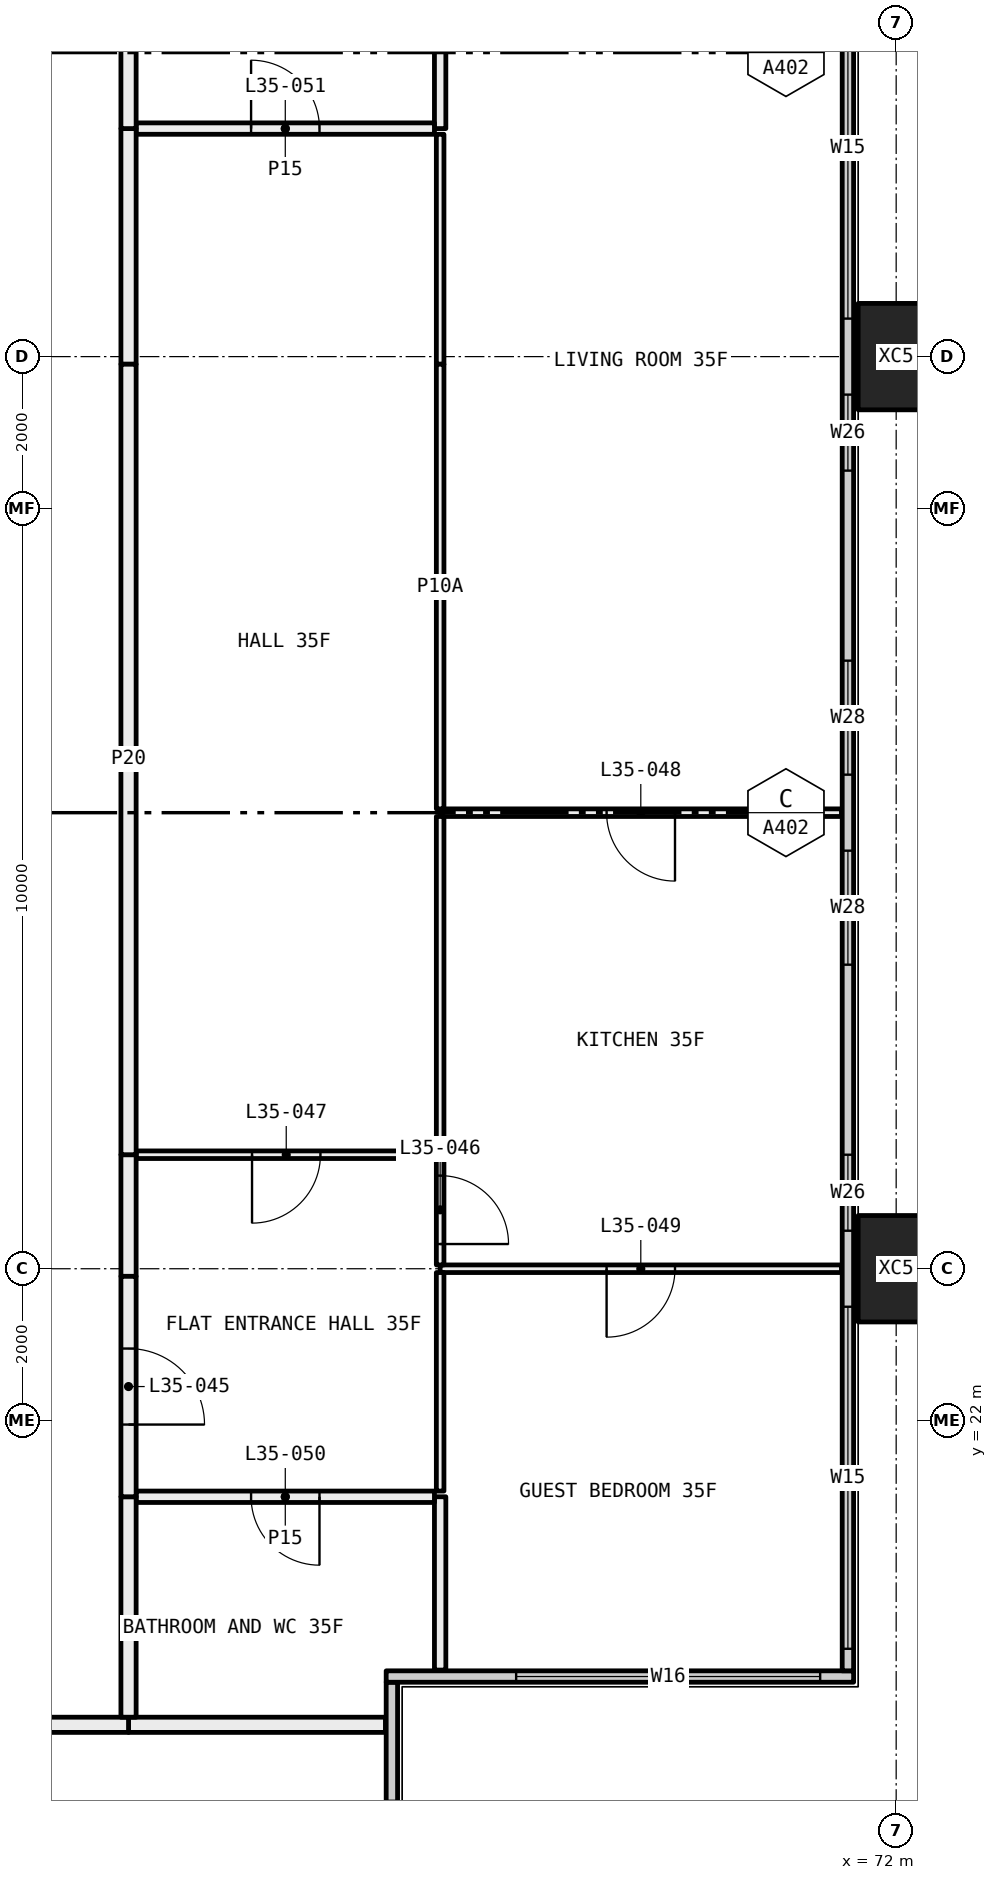
"""IFC4 building model, lengths in metres.
Left out: names, types, materials, properties, quantities, classifications, styles, units other than length and angle.
Written with IfcOpenShell. Run it as: python <this file> out.ifc"""

import sys

from ifc_helpers import new_model, si_unit, direction, frame, frame_2d, origin, origin_2d, place, context, subcontext, project, spatial, rectangle, hollow_rectangle, extrude, element, fill, save


model = new_model("IFC4")
c1 = context("Model", 3, precision=1e-05, world=origin(), true_north=direction((0.0, 1.0)))
c2 = subcontext(c1, "Body", "Model", "MODEL_VIEW")
j1 = project(units=[si_unit("LENGTHUNIT", "METRE"), si_unit("PLANEANGLEUNIT", "RADIAN")], contexts=[c1])
p1 = place(None, origin())
s1 = spatial("IfcSite", under=j1, at=p1, CompositionType="ELEMENT")
p2 = place(p1, origin())
s2 = spatial("IfcBuilding", under=s1, at=p2, CompositionType="ELEMENT")
p3 = place(p2, frame((0.0, 0.0, 134.55)))
s3 = spatial("IfcBuildingStorey", under=s2, at=p3, CompositionType="ELEMENT", Elevation=134.55)
for number, where, z_axis, x_axis in (
    (1, (72.0, 24.0, -0.4), (0.0, 0.0, 1.0), (0.0, 1.0, 0.0)),
    (2, (72.0, 36.0, -0.4), (0.0, 0.0, 1.0), (0.0, 1.0, 0.0)),
):
    element("IfcColumn", number, at=place(p3, frame(where, z_axis=z_axis, x_axis=x_axis)), inside=s3, PredefinedType="COLUMN", context=c2, shape_type="SweptSolid", body=[
        extrude(hollow_rectangle(XDim=1.4, YDim=1.0, WallThickness=0.055, at=origin_2d()), origin(), (0.0, 0.0, 1.0), 3.45),
    ])
p4 = place(p3, frame((65.365, 12.71, 0.0), z_axis=(0.0, 0.0, 1.0), x_axis=(0.0, 1.0, 0.0)))
e3 = element("IfcWall", 3, at=p4, inside=s3, PredefinedType="ELEMENTEDWALL", context=c2, shape_type="SweptSolid", body=[
    extrude(rectangle(XDim=5.85, YDim=0.15, at=frame_2d((2.925, 0.0))), origin(), (0.0, 0.0, 1.0), 3.05),
])
p5 = place(p4, frame((0.29, 0.0, 0.45)))
e4 = element("IfcOpeningElement", 4, at=p5, cuts=e3, PredefinedType="OPENING", context=c2, shape_type="SweptSolid", body=[
    extrude(rectangle(XDim=4.0, YDim=2.55, at=frame_2d((2.0, 1.275))), frame((0.0, 0.085, 0.0), z_axis=(0.0, -1.0, 0.0), x_axis=(1.0, 0.0, 0.0)), (0.0, 0.0, 1.0), 0.17),
])
p6 = place(p3, frame((65.29, 18.635, 0.0), z_axis=(0.0, 0.0, 1.0), x_axis=(1.0, 0.0, 0.0)))
e5 = element("IfcWall", 5, at=p6, inside=s3, PredefinedType="ELEMENTEDWALL", context=c2, shape_type="SweptSolid", body=[
    extrude(rectangle(XDim=6.15, YDim=0.15, at=frame_2d((3.075, 0.0))), origin(), (0.0, 0.0, 1.0), 3.05),
])
p7 = place(p6, frame((1.71, 0.0, 0.45)))
e6 = element("IfcOpeningElement", 6, at=p7, cuts=e5, PredefinedType="OPENING", context=c2, shape_type="SweptSolid", body=[
    extrude(rectangle(XDim=4.0, YDim=2.55, at=frame_2d((2.0, 1.275))), frame((0.0, 0.085, 0.0), z_axis=(0.0, -1.0, 0.0), x_axis=(1.0, 0.0, 0.0)), (0.0, 0.0, 1.0), 0.17),
])
p8 = place(p3, frame((71.365, 18.71, 0.0), z_axis=(0.0, 0.0, 1.0), x_axis=(0.0, 1.0, 0.0)))
e7 = element("IfcWall", 7, at=p8, inside=s3, PredefinedType="ELEMENTEDWALL", context=c2, shape_type="SweptSolid", body=[
    extrude(rectangle(XDim=22.58, YDim=0.15, at=frame_2d((11.29, 0.0))), origin(), (0.0, 0.0, 1.0), 3.05),
])
p9 = place(p8, frame((0.29, 0.0, 0.45)))
e8 = element("IfcOpeningElement", 8, at=p9, cuts=e7, PredefinedType="OPENING", context=c2, shape_type="SweptSolid", body=[
    extrude(rectangle(XDim=4.5, YDim=2.55, at=frame_2d((2.25, 1.275))), frame((0.0, 0.085, 0.0), z_axis=(0.0, -1.0, 0.0), x_axis=(1.0, 0.0, 0.0)), (0.0, 0.0, 1.0), 0.17),
])
p10 = place(p8, frame((5.79, 0.0, 0.45)))
e9 = element("IfcOpeningElement", 9, at=p10, cuts=e7, PredefinedType="OPENING", context=c2, shape_type="SweptSolid", body=[
    extrude(rectangle(XDim=1.0, YDim=2.55, at=frame_2d((0.5, 1.275))), frame((0.0, 0.085, 0.0), z_axis=(0.0, -1.0, 0.0), x_axis=(1.0, 0.0, 0.0)), (0.0, 0.0, 1.0), 0.17),
])
p11 = place(p8, frame((9.29, 0.0, 0.45)))
e10 = element("IfcOpeningElement", 10, at=p11, cuts=e7, PredefinedType="OPENING", context=c2, shape_type="SweptSolid", body=[
    extrude(rectangle(XDim=1.5, YDim=2.55, at=frame_2d((0.75, 1.275))), frame((0.0, 0.085, 0.0), z_axis=(0.0, -1.0, 0.0), x_axis=(1.0, 0.0, 0.0)), (0.0, 0.0, 1.0), 0.17),
])
p12 = place(p8, frame((11.79, 0.0, 0.45)))
e11 = element("IfcOpeningElement", 11, at=p12, cuts=e7, PredefinedType="OPENING", context=c2, shape_type="SweptSolid", body=[
    extrude(rectangle(XDim=1.5, YDim=2.55, at=frame_2d((0.75, 1.275))), frame((0.0, 0.085, 0.0), z_axis=(0.0, -1.0, 0.0), x_axis=(1.0, 0.0, 0.0)), (0.0, 0.0, 1.0), 0.17),
])
p13 = place(p8, frame((15.79, 0.0, 0.45)))
e12 = element("IfcOpeningElement", 12, at=p13, cuts=e7, PredefinedType="OPENING", context=c2, shape_type="SweptSolid", body=[
    extrude(rectangle(XDim=1.0, YDim=2.55, at=frame_2d((0.5, 1.275))), frame((0.0, 0.085, 0.0), z_axis=(0.0, -1.0, 0.0), x_axis=(1.0, 0.0, 0.0)), (0.0, 0.0, 1.0), 0.17),
])
p14 = place(p8, frame((17.79, 0.0, 0.45)))
e13 = element("IfcOpeningElement", 13, at=p14, cuts=e7, PredefinedType="OPENING", context=c2, shape_type="SweptSolid", body=[
    extrude(rectangle(XDim=4.5, YDim=2.55, at=frame_2d((2.25, 1.275))), frame((0.0, 0.085, 0.0), z_axis=(0.0, -1.0, 0.0), x_axis=(1.0, 0.0, 0.0)), (0.0, 0.0, 1.0), 0.17),
])
p15 = place(p3, frame((65.28, 18.0, 0.0), z_axis=(0.0, 0.0, 1.0), x_axis=(-1.0, 0.0, 0.0)))
e14 = element("IfcWall", 14, at=p15, inside=s3, PredefinedType="PARTITIONING", context=c2, shape_type="SweptSolid", body=[
    extrude(rectangle(XDim=3.38, YDim=0.2, at=frame_2d((1.69, 0.0))), origin(), (0.0, 0.0, 1.0), 3.05),
])
p16 = place(p3, frame((61.9, 18.0, 0.0), z_axis=(0.0, 0.0, 1.0), x_axis=(-1.0, 0.0, 0.0)))
e15 = element("IfcWall", 15, at=p16, inside=s3, PredefinedType="PARTITIONING", context=c2, shape_type="SweptSolid", body=[
    extrude(rectangle(XDim=1.9, YDim=0.2, at=frame_2d((0.95, 0.0))), origin(), (0.0, 0.0, 1.0), 3.05),
])
p17 = place(p3, frame((71.28, 24.0, 0.0), z_axis=(0.0, 0.0, 1.0), x_axis=(-1.0, 0.0, 0.0)))
e16 = element("IfcWall", 16, at=p17, inside=s3, PredefinedType="PARTITIONING", context=c2, shape_type="SweptSolid", body=[
    extrude(rectangle(XDim=5.28, YDim=0.1, at=frame_2d((2.64, 0.0))), origin(), (0.0, 0.0, 1.0), 2.45),
])
p18 = place(p17, frame((2.19, 0.0, 0.0)))
e17 = element("IfcOpeningElement", 17, at=p18, cuts=e16, PredefinedType="OPENING", context=c2, shape_type="SweptSolid", body=[
    extrude(rectangle(XDim=0.9, YDim=2.1, at=frame_2d((0.45, 1.05))), frame((0.0, 0.06, 0.0), z_axis=(0.0, -1.0, 0.0), x_axis=(1.0, 0.0, 0.0)), (0.0, 0.0, 1.0), 0.12),
])
p19 = place(p3, frame((66.0, 21.0, 0.0), z_axis=(0.0, 0.0, 1.0), x_axis=(0.0, -1.0, 0.0)))
e18 = element("IfcWall", 18, at=p19, inside=s3, PredefinedType="PARTITIONING", context=c2, shape_type="SweptSolid", body=[
    extrude(rectangle(XDim=2.28, YDim=0.15, at=frame_2d((1.14, 0.0))), origin(), (0.0, 0.0, 1.0), 3.05),
])
p20 = place(p3, frame((66.0, 23.95, 0.0), z_axis=(0.0, 0.0, 1.0), x_axis=(0.0, -1.0, 0.0)))
e19 = element("IfcWall", 19, at=p20, inside=s3, PredefinedType="PARTITIONING", context=c2, shape_type="SweptSolid", body=[
    extrude(rectangle(XDim=2.875, YDim=0.1, at=frame_2d((1.438, 0.0))), origin(), (0.0, 0.0, 1.0), 2.45),
])
p21 = place(p3, frame((71.28, 30.0, 0.0), z_axis=(0.0, 0.0, 1.0), x_axis=(-1.0, 0.0, 0.0)))
e20 = element("IfcWall", 20, at=p21, inside=s3, PredefinedType="PARTITIONING", context=c2, shape_type="SweptSolid", body=[
    extrude(rectangle(XDim=5.28, YDim=0.1, at=frame_2d((2.64, 0.0))), origin(), (0.0, 0.0, 1.0), 3.05),
])
p22 = place(p21, frame((2.19, 0.0, 0.0)))
e21 = element("IfcOpeningElement", 21, at=p22, cuts=e20, PredefinedType="OPENING", context=c2, shape_type="SweptSolid", body=[
    extrude(rectangle(XDim=0.9, YDim=2.1, at=frame_2d((0.45, 1.05))), frame((0.0, 0.06, 0.0), z_axis=(0.0, -1.0, 0.0), x_axis=(1.0, 0.0, 0.0)), (0.0, 0.0, 1.0), 0.12),
])
p23 = place(p3, frame((66.0, 25.5, 0.0), z_axis=(0.0, 0.0, 1.0), x_axis=(0.0, -1.0, 0.0)))
e22 = element("IfcWall", 22, at=p23, inside=s3, PredefinedType="PARTITIONING", context=c2, shape_type="SweptSolid", body=[
    extrude(rectangle(XDim=1.45, YDim=0.1, at=frame_2d((0.725, 0.0))), origin(), (0.0, 0.0, 1.0), 2.45),
])
p24 = place(p23, frame((0.275, 0.0, 0.0)))
e23 = element("IfcOpeningElement", 23, at=p24, cuts=e22, PredefinedType="OPENING", context=c2, shape_type="SweptSolid", body=[
    extrude(rectangle(XDim=0.9, YDim=2.1, at=frame_2d((0.45, 1.05))), frame((0.0, 0.06, 0.0), z_axis=(0.0, -1.0, 0.0), x_axis=(1.0, 0.0, 0.0)), (0.0, 0.0, 1.0), 0.12),
])
p25 = place(p3, frame((66.0, 29.95, 0.0), z_axis=(0.0, 0.0, 1.0), x_axis=(0.0, -1.0, 0.0)))
e24 = element("IfcWall", 24, at=p25, inside=s3, PredefinedType="PARTITIONING", context=c2, shape_type="SweptSolid", body=[
    extrude(rectangle(XDim=4.45, YDim=0.1, at=frame_2d((2.225, 0.0))), origin(), (0.0, 0.0, 1.0), 3.05),
])
p26 = place(p3, frame((66.0, 38.925, 0.0), z_axis=(0.0, 0.0, 1.0), x_axis=(0.0, -1.0, 0.0)))
e25 = element("IfcWall", 25, at=p26, inside=s3, PredefinedType="PARTITIONING", context=c2, shape_type="SweptSolid", body=[
    extrude(rectangle(XDim=3.025, YDim=0.1, at=frame_2d((1.513, 0.0))), origin(), (0.0, 0.0, 1.0), 2.45),
])
p27 = place(p3, frame((66.0, 35.9, 0.0), z_axis=(0.0, 0.0, 1.0), x_axis=(0.0, -1.0, 0.0)))
e26 = element("IfcWall", 26, at=p27, inside=s3, PredefinedType="PARTITIONING", context=c2, shape_type="SweptSolid", body=[
    extrude(rectangle(XDim=5.85, YDim=0.1, at=frame_2d((2.925, 0.0))), origin(), (0.0, 0.0, 1.0), 3.05),
])
p28 = place(p3, frame((66.0, 41.28, 0.0), z_axis=(0.0, 0.0, 1.0), x_axis=(0.0, -1.0, 0.0)))
e27 = element("IfcWall", 27, at=p28, inside=s3, PredefinedType="PARTITIONING", context=c2, shape_type="SweptSolid", body=[
    extrude(rectangle(XDim=2.28, YDim=0.15, at=frame_2d((1.14, 0.0))), origin(), (0.0, 0.0, 1.0), 3.05),
])
p29 = place(p3, frame((65.925, 21.0, 0.0), z_axis=(0.0, 0.0, 1.0), x_axis=(-1.0, 0.0, 0.0)))
e28 = element("IfcWall", 28, at=p29, inside=s3, PredefinedType="PARTITIONING", context=c2, shape_type="SweptSolid", body=[
    extrude(rectangle(XDim=3.925, YDim=0.15, at=frame_2d((1.962, 0.0))), origin(), (0.0, 0.0, 1.0), 3.05),
])
p30 = place(p29, frame((1.512, 0.0, 0.0)))
e29 = element("IfcOpeningElement", 29, at=p30, cuts=e28, PredefinedType="OPENING", context=c2, shape_type="SweptSolid", body=[
    extrude(rectangle(XDim=0.9, YDim=2.1, at=frame_2d((0.45, 1.05))), frame((0.0, 0.085, 0.0), z_axis=(0.0, -1.0, 0.0), x_axis=(1.0, 0.0, 0.0)), (0.0, 0.0, 1.0), 0.17),
])
p31 = place(p3, frame((61.9, 21.0, 0.0), z_axis=(0.0, 0.0, 1.0), x_axis=(0.0, -1.0, 0.0)))
e30 = element("IfcWall", 30, at=p31, inside=s3, PredefinedType="PARTITIONING", context=c2, shape_type="SweptSolid", body=[
    extrude(rectangle(XDim=2.9, YDim=0.2, at=frame_2d((1.45, 0.0))), origin(), (0.0, 0.0, 1.0), 3.05),
])
p32 = place(p3, frame((65.95, 25.5, 0.0), z_axis=(0.0, 0.0, 1.0), x_axis=(-1.0, 0.0, 0.0)))
e31 = element("IfcWall", 31, at=p32, inside=s3, PredefinedType="PARTITIONING", context=c2, shape_type="SweptSolid", body=[
    extrude(rectangle(XDim=3.95, YDim=0.1, at=frame_2d((1.975, 0.0))), origin(), (0.0, 0.0, 1.0), 3.05),
])
p33 = place(p32, frame((1.525, 0.0, 0.0)))
e32 = element("IfcOpeningElement", 32, at=p33, cuts=e31, PredefinedType="OPENING", context=c2, shape_type="SweptSolid", body=[
    extrude(rectangle(XDim=0.9, YDim=2.1, at=frame_2d((0.45, 1.05))), frame((0.0, 0.06, 0.0), z_axis=(0.0, -1.0, 0.0), x_axis=(1.0, 0.0, 0.0)), (0.0, 0.0, 1.0), 0.12),
])
p34 = place(p3, frame((61.9, 25.5, 0.0), z_axis=(0.0, 0.0, 1.0), x_axis=(0.0, -1.0, 0.0)))
e33 = element("IfcWall", 33, at=p34, inside=s3, PredefinedType="PARTITIONING", context=c2, shape_type="SweptSolid", body=[
    extrude(rectangle(XDim=1.6, YDim=0.2, at=frame_2d((0.8, 0.0))), origin(), (0.0, 0.0, 1.0), 2.45),
])
p35 = place(p3, frame((61.9, 23.9, 0.0), z_axis=(0.0, 0.0, 1.0), x_axis=(0.0, -1.0, 0.0)))
e34 = element("IfcWall", 34, at=p35, inside=s3, PredefinedType="PARTITIONING", context=c2, shape_type="SweptSolid", body=[
    extrude(rectangle(XDim=2.9, YDim=0.2, at=frame_2d((1.45, 0.0))), origin(), (0.0, 0.0, 1.0), 3.05),
])
p36 = place(p35, frame((0.95, 0.0, 0.0)))
e35 = element("IfcOpeningElement", 35, at=p36, cuts=e34, PredefinedType="OPENING", context=c2, shape_type="SweptSolid", body=[
    extrude(rectangle(XDim=1.0, YDim=2.1, at=frame_2d((0.5, 1.05))), frame((0.0, 0.11, 0.0), z_axis=(0.0, -1.0, 0.0), x_axis=(1.0, 0.0, 0.0)), (0.0, 0.0, 1.0), 0.22),
])
p37 = place(p3, frame((65.925, 39.0, 0.0), z_axis=(0.0, 0.0, 1.0), x_axis=(-1.0, 0.0, 0.0)))
e36 = element("IfcWall", 36, at=p37, inside=s3, PredefinedType="PARTITIONING", context=c2, shape_type="SweptSolid", body=[
    extrude(rectangle(XDim=3.925, YDim=0.15, at=frame_2d((1.962, 0.0))), origin(), (0.0, 0.0, 1.0), 3.05),
])
p38 = place(p37, frame((1.512, 0.0, 0.0)))
e37 = element("IfcOpeningElement", 37, at=p38, cuts=e36, PredefinedType="OPENING", context=c2, shape_type="SweptSolid", body=[
    extrude(rectangle(XDim=0.9, YDim=2.1, at=frame_2d((0.45, 1.05))), frame((0.0, 0.085, 0.0), z_axis=(0.0, -1.0, 0.0), x_axis=(1.0, 0.0, 0.0)), (0.0, 0.0, 1.0), 0.17),
])
p39 = place(p3, frame((61.9, 39.0, 0.0), z_axis=(0.0, 0.0, 1.0), x_axis=(0.0, -1.0, 0.0)))
e38 = element("IfcWall", 38, at=p39, inside=s3, PredefinedType="PARTITIONING", context=c2, shape_type="SweptSolid", body=[
    extrude(rectangle(XDim=3.1, YDim=0.2, at=frame_2d((1.55, 0.0))), origin(), (0.0, 0.0, 1.0), 2.45),
])
p40 = place(p3, frame((61.9, 35.9, 0.0), z_axis=(0.0, 0.0, 1.0), x_axis=(0.0, -1.0, 0.0)))
e39 = element("IfcWall", 39, at=p40, inside=s3, PredefinedType="PARTITIONING", context=c2, shape_type="SweptSolid", body=[
    extrude(rectangle(XDim=10.4, YDim=0.2, at=frame_2d((5.2, 0.0))), origin(), (0.0, 0.0, 1.0), 3.05),
])
p41 = place(p3, frame((61.9, 41.9, 0.0), z_axis=(0.0, 0.0, 1.0), x_axis=(0.0, -1.0, 0.0)))
e40 = element("IfcWall", 40, at=p41, inside=s3, PredefinedType="PARTITIONING", context=c2, shape_type="SweptSolid", body=[
    extrude(rectangle(XDim=2.9, YDim=0.2, at=frame_2d((1.45, 0.0))), origin(), (0.0, 0.0, 1.0), 3.05),
])
p42 = place(p7, origin())
e41 = element("IfcWindow", 41, at=p42, inside=s3, PartitioningType="SINGLE_PANEL", PredefinedType="WINDOW", context=c2, shape_type="SweptSolid", body=[
    extrude(rectangle(XDim=4.0, YDim=2.55, at=frame_2d((2.0, 1.275))), frame((0.0, 0.03, 0.0), z_axis=(0.0, -1.0, 0.0), x_axis=(1.0, 0.0, 0.0)), (0.0, 0.0, 1.0), 0.06),
])
fill(e6, e41)
p43 = place(p9, origin())
e42 = element("IfcWindow", 42, at=p43, inside=s3, PartitioningType="SINGLE_PANEL", PredefinedType="WINDOW", context=c2, shape_type="SweptSolid", body=[
    extrude(rectangle(XDim=4.5, YDim=2.55, at=frame_2d((2.25, 1.275))), frame((0.0, 0.03, 0.0), z_axis=(0.0, -1.0, 0.0), x_axis=(1.0, 0.0, 0.0)), (0.0, 0.0, 1.0), 0.06),
])
fill(e8, e42)
p44 = place(p10, origin())
e43 = element("IfcWindow", 43, at=p44, inside=s3, PartitioningType="SINGLE_PANEL", PredefinedType="WINDOW", context=c2, shape_type="SweptSolid", body=[
    extrude(rectangle(XDim=1.0, YDim=2.55, at=frame_2d((0.5, 1.275))), frame((0.0, 0.03, 0.0), z_axis=(0.0, -1.0, 0.0), x_axis=(1.0, 0.0, 0.0)), (0.0, 0.0, 1.0), 0.06),
])
fill(e9, e43)
p45 = place(p11, origin())
e44 = element("IfcWindow", 44, at=p45, inside=s3, PartitioningType="SINGLE_PANEL", PredefinedType="WINDOW", context=c2, shape_type="SweptSolid", body=[
    extrude(rectangle(XDim=1.5, YDim=2.55, at=frame_2d((0.75, 1.275))), frame((0.0, 0.03, 0.0), z_axis=(0.0, -1.0, 0.0), x_axis=(1.0, 0.0, 0.0)), (0.0, 0.0, 1.0), 0.06),
])
fill(e10, e44)
p46 = place(p12, origin())
e45 = element("IfcWindow", 45, at=p46, inside=s3, PartitioningType="SINGLE_PANEL", PredefinedType="WINDOW", context=c2, shape_type="SweptSolid", body=[
    extrude(rectangle(XDim=1.5, YDim=2.55, at=frame_2d((0.75, 1.275))), frame((0.0, 0.03, 0.0), z_axis=(0.0, -1.0, 0.0), x_axis=(1.0, 0.0, 0.0)), (0.0, 0.0, 1.0), 0.06),
])
fill(e11, e45)
p47 = place(p13, origin())
e46 = element("IfcWindow", 46, at=p47, inside=s3, PartitioningType="SINGLE_PANEL", PredefinedType="WINDOW", context=c2, shape_type="SweptSolid", body=[
    extrude(rectangle(XDim=1.0, YDim=2.55, at=frame_2d((0.5, 1.275))), frame((0.0, 0.03, 0.0), z_axis=(0.0, -1.0, 0.0), x_axis=(1.0, 0.0, 0.0)), (0.0, 0.0, 1.0), 0.06),
])
fill(e12, e46)
p48 = place(p14, origin())
e47 = element("IfcWindow", 47, at=p48, inside=s3, PartitioningType="SINGLE_PANEL", PredefinedType="WINDOW", context=c2, shape_type="SweptSolid", body=[
    extrude(rectangle(XDim=4.5, YDim=2.55, at=frame_2d((2.25, 1.275))), frame((0.0, 0.03, 0.0), z_axis=(0.0, -1.0, 0.0), x_axis=(1.0, 0.0, 0.0)), (0.0, 0.0, 1.0), 0.06),
])
fill(e13, e47)
p49 = place(p36, origin())
e48 = element("IfcDoor", 48, at=p49, inside=s3, OperationType="SINGLE_SWING_LEFT", PredefinedType="DOOR", context=c2, shape_type="SweptSolid", body=[
    extrude(rectangle(XDim=1.0, YDim=2.1, at=frame_2d((0.5, 1.05))), frame((0.0, 0.025, 0.0), z_axis=(0.0, -1.0, 0.0), x_axis=(1.0, 0.0, 0.0)), (0.0, 0.0, 1.0), 0.05),
])
fill(e35, e48)
p50 = place(p24, origin())
e49 = element("IfcDoor", 49, at=p50, inside=s3, OperationType="SINGLE_SWING_LEFT", PredefinedType="DOOR", context=c2, shape_type="SweptSolid", body=[
    extrude(rectangle(XDim=0.9, YDim=2.1, at=frame_2d((0.45, 1.05))), frame((0.0, 0.025, 0.0), z_axis=(0.0, -1.0, 0.0), x_axis=(1.0, 0.0, 0.0)), (0.0, 0.0, 1.0), 0.05),
])
fill(e23, e49)
p51 = place(p33, origin())
e50 = element("IfcDoor", 50, at=p51, inside=s3, OperationType="SINGLE_SWING_LEFT", PredefinedType="DOOR", context=c2, shape_type="SweptSolid", body=[
    extrude(rectangle(XDim=0.9, YDim=2.1, at=frame_2d((0.45, 1.05))), frame((0.0, 0.025, 0.0), z_axis=(0.0, -1.0, 0.0), x_axis=(1.0, 0.0, 0.0)), (0.0, 0.0, 1.0), 0.05),
])
fill(e32, e50)
p52 = place(p22, origin())
e51 = element("IfcDoor", 51, at=p52, inside=s3, OperationType="SINGLE_SWING_RIGHT", PredefinedType="DOOR", context=c2, shape_type="SweptSolid", body=[
    extrude(rectangle(XDim=0.9, YDim=2.1, at=frame_2d((0.45, 1.05))), frame((0.0, 0.025, 0.0), z_axis=(0.0, -1.0, 0.0), x_axis=(1.0, 0.0, 0.0)), (0.0, 0.0, 1.0), 0.05),
])
fill(e21, e51)
p53 = place(p18, origin())
e52 = element("IfcDoor", 52, at=p53, inside=s3, OperationType="SINGLE_SWING_LEFT", PredefinedType="DOOR", context=c2, shape_type="SweptSolid", body=[
    extrude(rectangle(XDim=0.9, YDim=2.1, at=frame_2d((0.45, 1.05))), frame((0.0, 0.025, 0.0), z_axis=(0.0, -1.0, 0.0), x_axis=(1.0, 0.0, 0.0)), (0.0, 0.0, 1.0), 0.05),
])
fill(e17, e52)
p54 = place(p30, origin())
e53 = element("IfcDoor", 53, at=p54, inside=s3, OperationType="SINGLE_SWING_RIGHT", PredefinedType="DOOR", context=c2, shape_type="SweptSolid", body=[
    extrude(rectangle(XDim=0.9, YDim=2.1, at=frame_2d((0.45, 1.05))), frame((0.0, 0.025, 0.0), z_axis=(0.0, -1.0, 0.0), x_axis=(1.0, 0.0, 0.0)), (0.0, 0.0, 1.0), 0.05),
])
fill(e29, e53)
p55 = place(p38, frame((0.9, 0.0, 0.0), x_axis=(-1.0, 0.0, 0.0)))
e54 = element("IfcDoor", 54, at=p55, inside=s3, OperationType="SINGLE_SWING_RIGHT", PredefinedType="DOOR", context=c2, shape_type="SweptSolid", body=[
    extrude(rectangle(XDim=0.9, YDim=2.1, at=frame_2d((0.45, 1.05))), frame((0.0, 0.025, 0.0), z_axis=(0.0, -1.0, 0.0), x_axis=(1.0, 0.0, 0.0)), (0.0, 0.0, 1.0), 0.05),
])
fill(e37, e54)
save(model, sys.argv[1])
